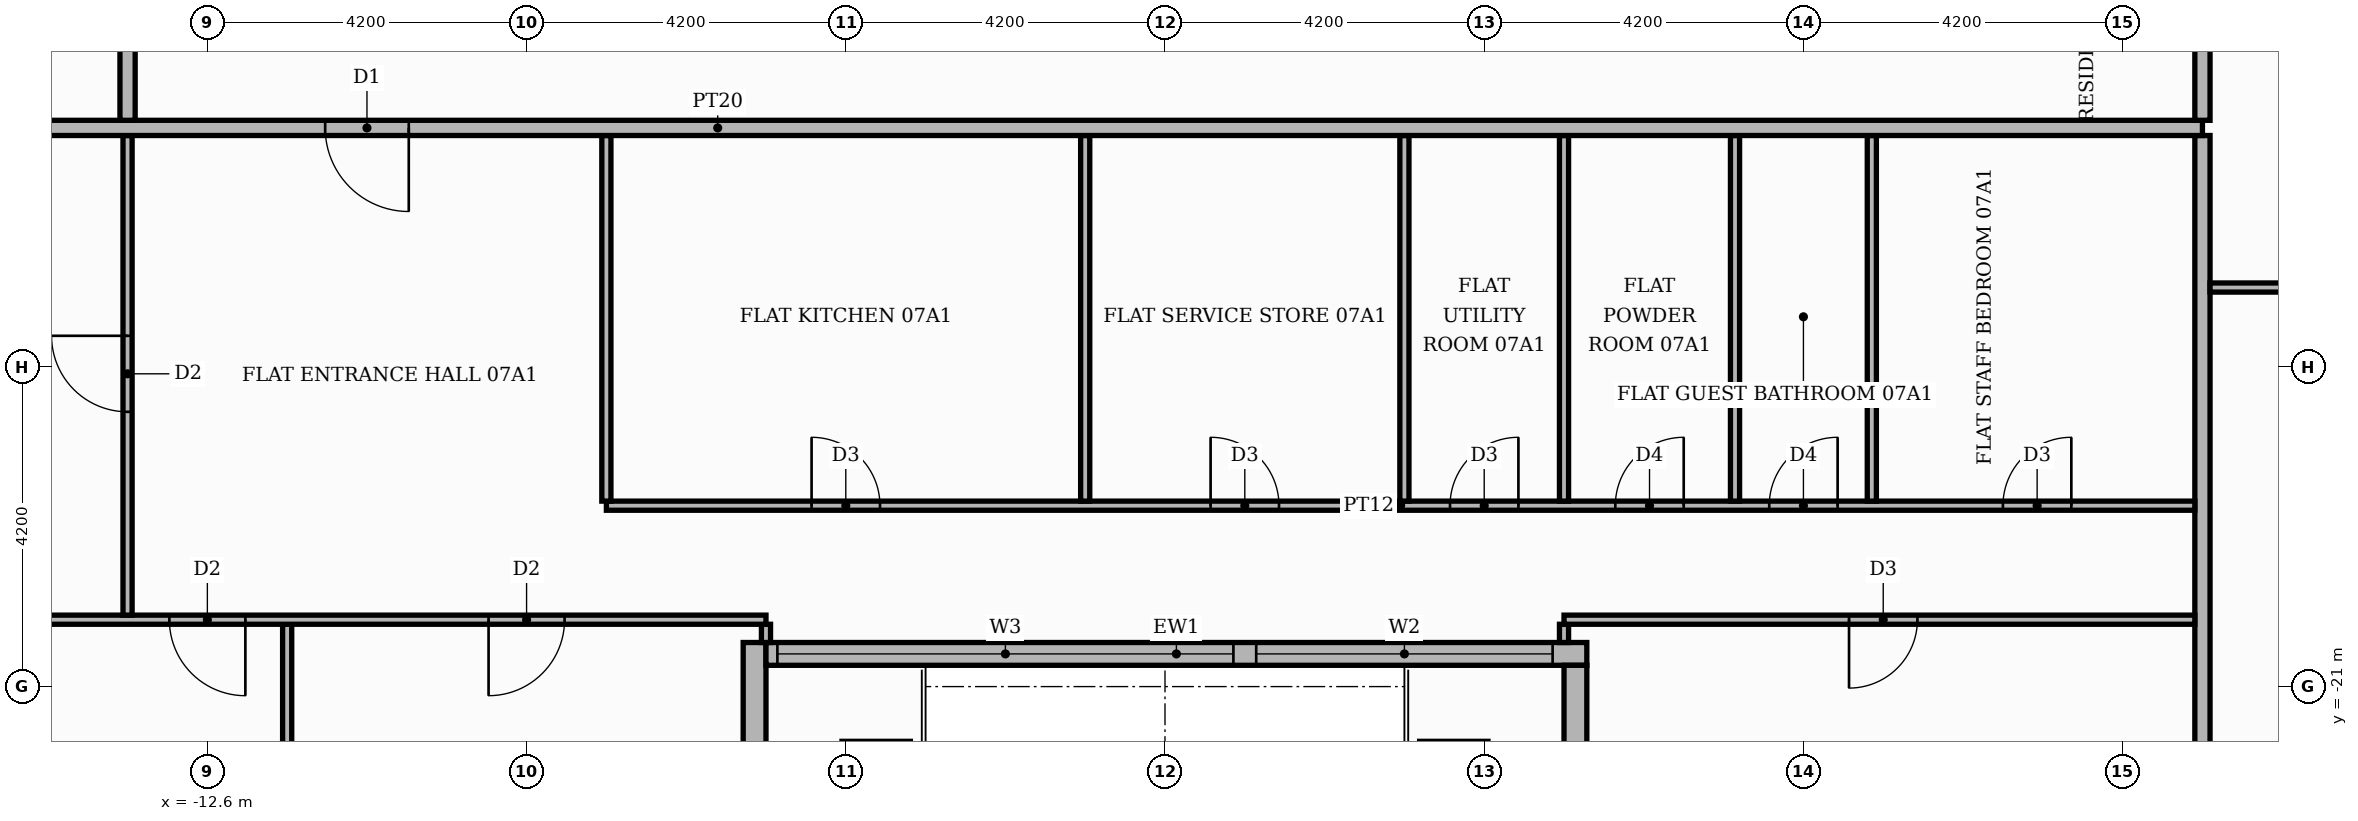
"""IFC4 building model, lengths in metres.
Left out: names, types, materials, properties, quantities, classifications, styles, units other than length and angle.
Written with IfcOpenShell. Run it as: python <this file> out.ifc"""

import sys

from ifc_helpers import new_model, si_unit, direction, frame, frame_2d, origin, place, context, subcontext, project, spatial, rectangle, extrude, element, fill, save


model = new_model("IFC4")
c1 = context("Model", 3, precision=1e-05, world=origin(), true_north=direction((0.0, 1.0)))
c2 = subcontext(c1, "Body", "Model", "MODEL_VIEW")
j1 = project(units=[si_unit("LENGTHUNIT", "METRE"), si_unit("PLANEANGLEUNIT", "RADIAN")], contexts=[c1])
p1 = place(None, origin())
s1 = spatial("IfcSite", under=j1, at=p1, CompositionType="ELEMENT")
p2 = place(p1, origin())
s2 = spatial("IfcBuilding", under=s1, at=p2, CompositionType="ELEMENT")
p3 = place(p2, frame((0.0, 0.0, 34.8)))
s3 = spatial("IfcBuildingStorey", under=s2, at=p3, CompositionType="ELEMENT", Elevation=34.8)
p4 = place(p3, frame((-5.4, -25.42, 0.0), z_axis=(0.0, 0.0, 1.0), x_axis=(0.0, 1.0, 0.0)))
e1 = element("IfcWall", 1, at=p4, inside=s3, PredefinedType="STANDARD", context=c2, shape_type="SweptSolid", body=[
    extrude(rectangle(XDim=5.0, YDim=0.3, at=frame_2d((2.5, 0.0))), origin(), (0.0, 0.0, 1.0), 3.48),
])
p5 = place(p4, frame((1.42, 0.0, 0.0)))
e2 = element("IfcOpeningElement", 2, at=p5, cuts=e1, PredefinedType="OPENING", context=c2, shape_type="SweptSolid", body=[
    extrude(rectangle(XDim=1.8, YDim=2.4, at=frame_2d((0.9, 1.2))), frame((0.0, 0.16, 0.0), z_axis=(0.0, -1.0, 0.0), x_axis=(1.0, 0.0, 0.0)), (0.0, 0.0, 1.0), 0.32),
])
p6 = place(p3, frame((-5.25, -20.57, 0.0), z_axis=(0.0, 0.0, 1.0), x_axis=(1.0, 0.0, 0.0)))
e3 = element("IfcWall", 3, at=p6, inside=s3, PredefinedType="STANDARD", context=c2, shape_type="SweptSolid", body=[
    extrude(rectangle(XDim=10.8, YDim=0.3, at=frame_2d((5.4, 0.0))), origin(), (0.0, 0.0, 1.0), 3.48),
])
p7 = place(p6, frame((0.15, 0.0, 0.9)))
e4 = element("IfcOpeningElement", 4, at=p7, cuts=e3, PredefinedType="OPENING", context=c2, shape_type="SweptSolid", body=[
    extrude(rectangle(XDim=6.0, YDim=2.1, at=frame_2d((3.0, 1.05))), frame((0.0, 0.16, 0.0), z_axis=(0.0, -1.0, 0.0), x_axis=(1.0, 0.0, 0.0)), (0.0, 0.0, 1.0), 0.32),
])
p8 = place(p6, frame((6.45, 0.0, 0.9)))
e5 = element("IfcOpeningElement", 5, at=p8, cuts=e3, PredefinedType="OPENING", context=c2, shape_type="SweptSolid", body=[
    extrude(rectangle(XDim=3.9, YDim=2.1, at=frame_2d((1.95, 1.05))), frame((0.0, 0.16, 0.0), z_axis=(0.0, -1.0, 0.0), x_axis=(1.0, 0.0, 0.0)), (0.0, 0.0, 1.0), 0.32),
])
p9 = place(p3, frame((5.4, -20.72, 0.0), z_axis=(0.0, 0.0, 1.0), x_axis=(0.0, -1.0, 0.0)))
e6 = element("IfcWall", 6, at=p9, inside=s3, PredefinedType="STANDARD", context=c2, shape_type="SweptSolid", body=[
    extrude(rectangle(XDim=5.0, YDim=0.3, at=frame_2d((2.5, 0.0))), origin(), (0.0, 0.0, 1.0), 3.48),
])
p10 = place(p9, frame((1.48, 0.0, 0.0)))
e7 = element("IfcOpeningElement", 7, at=p10, cuts=e6, PredefinedType="OPENING", context=c2, shape_type="SweptSolid", body=[
    extrude(rectangle(XDim=1.8, YDim=2.4, at=frame_2d((0.9, 1.2))), frame((0.0, 0.16, 0.0), z_axis=(0.0, -1.0, 0.0), x_axis=(1.0, 0.0, 0.0)), (0.0, 0.0, 1.0), 0.32),
])
p11 = place(p3, frame((-11.55, -25.42, 0.0), z_axis=(0.0, 0.0, 1.0), x_axis=(0.0, 1.0, 0.0)))
e8 = element("IfcWall", 8, at=p11, inside=s3, PredefinedType="PARTITIONING", context=c2, shape_type="SweptSolid", body=[
    extrude(rectangle(XDim=5.24, YDim=0.12, at=frame_2d((2.62, 0.0))), origin(), (0.0, 0.0, 1.0), 3.48),
])
p12 = place(p3, frame((13.65, -25.42, 0.0), z_axis=(0.0, 0.0, 1.0), x_axis=(0.0, 1.0, 0.0)))
e9 = element("IfcWall", 9, at=p12, inside=s3, PredefinedType="PARTITIONING", context=c2, shape_type="SweptSolid", body=[
    extrude(rectangle(XDim=11.67, YDim=0.2, at=frame_2d((5.835, 0.0))), origin(), (0.0, 0.0, 1.0), 3.48),
])
for number, where, z_axis, x_axis in (
    (10, (-5.25, -20.42, 0.0), (0.0, 0.0, 1.0), (0.0, 1.0, 0.0)),
    (11, (5.25, -20.42, 0.0), (0.0, 0.0, 1.0), (0.0, 1.0, 0.0)),
):
    element("IfcWall", number, at=place(p3, frame(where, z_axis=z_axis, x_axis=x_axis)), inside=s3, PredefinedType="PARTITIONING", context=c2, shape_type="SweptSolid", body=[
        extrude(rectangle(XDim=0.24, YDim=0.12, at=frame_2d((0.12, 0.0))), origin(), (0.0, 0.0, 1.0), 3.48),
    ])
p13 = place(p3, frame((-17.3, -20.12, 0.0), z_axis=(0.0, 0.0, 1.0), x_axis=(1.0, 0.0, 0.0)))
e12 = element("IfcWall", 12, at=p13, inside=s3, PredefinedType="PARTITIONING", context=c2, shape_type="SweptSolid", body=[
    extrude(rectangle(XDim=12.05, YDim=0.12, at=frame_2d((6.025, 0.0))), origin(), (0.0, 0.0, 1.0), 3.48),
])
p14 = place(p13, frame((4.2, 0.0, 0.0)))
e13 = element("IfcOpeningElement", 13, at=p14, cuts=e12, PredefinedType="OPENING", context=c2, shape_type="SweptSolid", body=[
    extrude(rectangle(XDim=1.0, YDim=2.1, at=frame_2d((0.5, 1.05))), frame((0.0, 0.07, 0.0), z_axis=(0.0, -1.0, 0.0), x_axis=(1.0, 0.0, 0.0)), (0.0, 0.0, 1.0), 0.14),
])
p15 = place(p13, frame((8.4, 0.0, 0.0)))
e14 = element("IfcOpeningElement", 14, at=p15, cuts=e12, PredefinedType="OPENING", context=c2, shape_type="SweptSolid", body=[
    extrude(rectangle(XDim=1.0, YDim=2.1, at=frame_2d((0.5, 1.05))), frame((0.0, 0.07, 0.0), z_axis=(0.0, -1.0, 0.0), x_axis=(1.0, 0.0, 0.0)), (0.0, 0.0, 1.0), 0.14),
])
p16 = place(p3, frame((5.25, -20.12, 0.0), z_axis=(0.0, 0.0, 1.0), x_axis=(1.0, 0.0, 0.0)))
e15 = element("IfcWall", 15, at=p16, inside=s3, PredefinedType="PARTITIONING", context=c2, shape_type="SweptSolid", body=[
    extrude(rectangle(XDim=8.3, YDim=0.12, at=frame_2d((4.15, 0.0))), origin(), (0.0, 0.0, 1.0), 3.48),
])
p17 = place(p16, frame((3.75, 0.0, 0.0)))
e16 = element("IfcOpeningElement", 16, at=p17, cuts=e15, PredefinedType="OPENING", context=c2, shape_type="SweptSolid", body=[
    extrude(rectangle(XDim=0.9, YDim=2.1, at=frame_2d((0.45, 1.05))), frame((0.0, 0.07, 0.0), z_axis=(0.0, -1.0, 0.0), x_axis=(1.0, 0.0, 0.0)), (0.0, 0.0, 1.0), 0.14),
])
p18 = place(p3, frame((-13.65, -20.06, 0.0), z_axis=(0.0, 0.0, 1.0), x_axis=(0.0, 1.0, 0.0)))
e17 = element("IfcWall", 17, at=p18, inside=s3, PredefinedType="PARTITIONING", context=c2, shape_type="SweptSolid", body=[
    extrude(rectangle(XDim=6.31, YDim=0.12, at=frame_2d((3.155, 0.0))), origin(), (0.0, 0.0, 1.0), 3.48),
])
p19 = place(p18, frame((2.675, 0.0, 0.0)))
e18 = element("IfcOpeningElement", 18, at=p19, cuts=e17, PredefinedType="OPENING", context=c2, shape_type="SweptSolid", body=[
    extrude(rectangle(XDim=1.0, YDim=2.1, at=frame_2d((0.5, 1.05))), frame((0.0, 0.07, 0.0), z_axis=(0.0, -1.0, 0.0), x_axis=(1.0, 0.0, 0.0)), (0.0, 0.0, 1.0), 0.14),
])
p20 = place(p3, frame((-7.35, -18.62, 0.0), z_axis=(0.0, 0.0, 1.0), x_axis=(1.0, 0.0, 0.0)))
e19 = element("IfcWall", 19, at=p20, inside=s3, PredefinedType="PARTITIONING", context=c2, shape_type="SweptSolid", body=[
    extrude(rectangle(XDim=20.9, YDim=0.12, at=frame_2d((10.45, 0.0))), origin(), (0.0, 0.0, 1.0), 3.48),
])
p21 = place(p20, frame((2.7, 0.0, 0.0)))
e20 = element("IfcOpeningElement", 20, at=p21, cuts=e19, PredefinedType="OPENING", context=c2, shape_type="SweptSolid", body=[
    extrude(rectangle(XDim=0.9, YDim=2.1, at=frame_2d((0.45, 1.05))), frame((0.0, 0.07, 0.0), z_axis=(0.0, -1.0, 0.0), x_axis=(1.0, 0.0, 0.0)), (0.0, 0.0, 1.0), 0.14),
])
p22 = place(p20, frame((7.95, 0.0, 0.0)))
e21 = element("IfcOpeningElement", 21, at=p22, cuts=e19, PredefinedType="OPENING", context=c2, shape_type="SweptSolid", body=[
    extrude(rectangle(XDim=0.9, YDim=2.1, at=frame_2d((0.45, 1.05))), frame((0.0, 0.07, 0.0), z_axis=(0.0, -1.0, 0.0), x_axis=(1.0, 0.0, 0.0)), (0.0, 0.0, 1.0), 0.14),
])
p23 = place(p20, frame((11.1, 0.0, 0.0)))
e22 = element("IfcOpeningElement", 22, at=p23, cuts=e19, PredefinedType="OPENING", context=c2, shape_type="SweptSolid", body=[
    extrude(rectangle(XDim=0.9, YDim=2.1, at=frame_2d((0.45, 1.05))), frame((0.0, 0.07, 0.0), z_axis=(0.0, -1.0, 0.0), x_axis=(1.0, 0.0, 0.0)), (0.0, 0.0, 1.0), 0.14),
])
p24 = place(p20, frame((13.275, 0.0, 0.0)))
e23 = element("IfcOpeningElement", 23, at=p24, cuts=e19, PredefinedType="OPENING", context=c2, shape_type="SweptSolid", body=[
    extrude(rectangle(XDim=0.9, YDim=2.1, at=frame_2d((0.45, 1.05))), frame((0.0, 0.07, 0.0), z_axis=(0.0, -1.0, 0.0), x_axis=(1.0, 0.0, 0.0)), (0.0, 0.0, 1.0), 0.14),
])
p25 = place(p20, frame((15.3, 0.0, 0.0)))
e24 = element("IfcOpeningElement", 24, at=p25, cuts=e19, PredefinedType="OPENING", context=c2, shape_type="SweptSolid", body=[
    extrude(rectangle(XDim=0.9, YDim=2.1, at=frame_2d((0.45, 1.05))), frame((0.0, 0.07, 0.0), z_axis=(0.0, -1.0, 0.0), x_axis=(1.0, 0.0, 0.0)), (0.0, 0.0, 1.0), 0.14),
])
p26 = place(p20, frame((18.375, 0.0, 0.0)))
e25 = element("IfcOpeningElement", 25, at=p26, cuts=e19, PredefinedType="OPENING", context=c2, shape_type="SweptSolid", body=[
    extrude(rectangle(XDim=0.9, YDim=2.1, at=frame_2d((0.45, 1.05))), frame((0.0, 0.07, 0.0), z_axis=(0.0, -1.0, 0.0), x_axis=(1.0, 0.0, 0.0)), (0.0, 0.0, 1.0), 0.14),
])
for number, where, z_axis, x_axis in (
    (26, (-7.35, -18.56, 0.0), (0.0, 0.0, 1.0), (0.0, 1.0, 0.0)),
    (27, (-1.05, -18.56, 0.0), (0.0, 0.0, 1.0), (0.0, 1.0, 0.0)),
    (28, (3.15, -18.56, 0.0), (0.0, 0.0, 1.0), (0.0, 1.0, 0.0)),
    (29, (5.25, -18.56, 0.0), (0.0, 0.0, 1.0), (0.0, 1.0, 0.0)),
    (30, (7.5, -18.56, 0.0), (0.0, 0.0, 1.0), (0.0, 1.0, 0.0)),
    (31, (9.3, -18.56, 0.0), (0.0, 0.0, 1.0), (0.0, 1.0, 0.0)),
):
    element("IfcWall", number, at=place(p3, frame(where, z_axis=z_axis, x_axis=x_axis)), inside=s3, PredefinedType="PARTITIONING", context=c2, shape_type="SweptSolid", body=[
        extrude(rectangle(XDim=4.81, YDim=0.12, at=frame_2d((2.405, 0.0))), origin(), (0.0, 0.0, 1.0), 3.48),
    ])
p27 = place(p3, frame((13.75, -15.75, 0.0), z_axis=(0.0, 0.0, 1.0), x_axis=(1.0, 0.0, 0.0)))
e32 = element("IfcWall", 32, at=p27, inside=s3, PredefinedType="PARTITIONING", context=c2, shape_type="SweptSolid", body=[
    extrude(rectangle(XDim=6.67, YDim=0.12, at=frame_2d((3.335, 0.0))), origin(), (0.0, 0.0, 1.0), 3.48),
])
p28 = place(p27, frame((2.785, 0.0, 0.0)))
e33 = element("IfcOpeningElement", 33, at=p28, cuts=e32, PredefinedType="OPENING", context=c2, shape_type="SweptSolid", body=[
    extrude(rectangle(XDim=1.0, YDim=2.1, at=frame_2d((0.5, 1.05))), frame((0.0, 0.07, 0.0), z_axis=(0.0, -1.0, 0.0), x_axis=(1.0, 0.0, 0.0)), (0.0, 0.0, 1.0), 0.14),
])
p29 = place(p3, frame((-25.42, -13.65, 0.0), z_axis=(0.0, 0.0, 1.0), x_axis=(1.0, 0.0, 0.0)))
e34 = element("IfcWall", 34, at=p29, inside=s3, PredefinedType="PARTITIONING", context=c2, shape_type="SweptSolid", body=[
    extrude(rectangle(XDim=39.07, YDim=0.2, at=frame_2d((19.535, 0.0))), origin(), (0.0, 0.0, 1.0), 3.48),
])
p30 = place(p29, frame((14.37, 0.0, 0.0)))
e35 = element("IfcOpeningElement", 35, at=p30, cuts=e34, PredefinedType="OPENING", context=c2, shape_type="SweptSolid", body=[
    extrude(rectangle(XDim=1.1, YDim=2.4, at=frame_2d((0.55, 1.2))), frame((0.0, 0.11, 0.0), z_axis=(0.0, -1.0, 0.0), x_axis=(1.0, 0.0, 0.0)), (0.0, 0.0, 1.0), 0.22),
])
p31 = place(p3, frame((-13.65, -13.55, 0.0), z_axis=(0.0, 0.0, 1.0), x_axis=(0.0, 1.0, 0.0)))
e36 = element("IfcWall", 36, at=p31, inside=s3, PredefinedType="PARTITIONING", context=c2, shape_type="SweptSolid", body=[
    extrude(rectangle(XDim=27.1, YDim=0.2, at=frame_2d((13.55, 0.0))), origin(), (0.0, 0.0, 1.0), 3.48),
])
p32 = place(p31, frame((24.55, 0.0, 0.0)))
e37 = element("IfcOpeningElement", 37, at=p32, cuts=e36, PredefinedType="OPENING", context=c2, shape_type="SweptSolid", body=[
    extrude(rectangle(XDim=1.1, YDim=2.4, at=frame_2d((0.55, 1.2))), frame((0.0, 0.11, 0.0), z_axis=(0.0, -1.0, 0.0), x_axis=(1.0, 0.0, 0.0)), (0.0, 0.0, 1.0), 0.22),
])
p33 = place(p3, frame((13.65, -13.55, 0.0), z_axis=(0.0, 0.0, 1.0), x_axis=(0.0, 1.0, 0.0)))
e38 = element("IfcWall", 38, at=p33, inside=s3, PredefinedType="PARTITIONING", context=c2, shape_type="SweptSolid", body=[
    extrude(rectangle(XDim=8.2, YDim=0.2, at=frame_2d((4.1, 0.0))), origin(), (0.0, 0.0, 1.0), 3.48),
])
p34 = place(p33, frame((1.45, 0.0, 0.0)))
e39 = element("IfcOpeningElement", 39, at=p34, cuts=e38, PredefinedType="OPENING", context=c2, shape_type="SweptSolid", body=[
    extrude(rectangle(XDim=1.1, YDim=2.4, at=frame_2d((0.55, 1.2))), frame((0.0, 0.11, 0.0), z_axis=(0.0, -1.0, 0.0), x_axis=(1.0, 0.0, 0.0)), (0.0, 0.0, 1.0), 0.22),
])
p35 = place(p7, origin())
e40 = element("IfcWindow", 40, at=p35, inside=s3, PartitioningType="SINGLE_PANEL", PredefinedType="WINDOW", context=c2, shape_type="SweptSolid", body=[
    extrude(rectangle(XDim=6.0, YDim=2.1, at=frame_2d((3.0, 1.05))), frame((0.0, 0.03, 0.0), z_axis=(0.0, -1.0, 0.0), x_axis=(1.0, 0.0, 0.0)), (0.0, 0.0, 1.0), 0.06),
])
fill(e4, e40)
p36 = place(p8, origin())
e41 = element("IfcWindow", 41, at=p36, inside=s3, PartitioningType="SINGLE_PANEL", PredefinedType="WINDOW", context=c2, shape_type="SweptSolid", body=[
    extrude(rectangle(XDim=3.9, YDim=2.1, at=frame_2d((1.95, 1.05))), frame((0.0, 0.03, 0.0), z_axis=(0.0, -1.0, 0.0), x_axis=(1.0, 0.0, 0.0)), (0.0, 0.0, 1.0), 0.06),
])
fill(e5, e41)
p37 = place(p30, frame((1.1, 0.0, 0.0), z_axis=(0.0, 0.0, 1.0), x_axis=(-1.0, 0.0, 0.0)))
e42 = element("IfcDoor", 42, at=p37, inside=s3, OperationType="SINGLE_SWING_RIGHT", PredefinedType="DOOR", context=c2, shape_type="SweptSolid", body=[
    extrude(rectangle(XDim=1.1, YDim=2.4, at=frame_2d((0.55, 1.2))), frame((0.0, 0.025, 0.0), z_axis=(0.0, -1.0, 0.0), x_axis=(1.0, 0.0, 0.0)), (0.0, 0.0, 1.0), 0.05),
])
fill(e35, e42)
p38 = place(p19, origin())
e43 = element("IfcDoor", 43, at=p38, inside=s3, OperationType="SINGLE_SWING_RIGHT", PredefinedType="DOOR", context=c2, shape_type="SweptSolid", body=[
    extrude(rectangle(XDim=1.0, YDim=2.1, at=frame_2d((0.5, 1.05))), frame((0.0, 0.025, 0.0), z_axis=(0.0, -1.0, 0.0), x_axis=(1.0, 0.0, 0.0)), (0.0, 0.0, 1.0), 0.05),
])
fill(e18, e43)
p39 = place(p21, origin())
e44 = element("IfcDoor", 44, at=p39, inside=s3, OperationType="SINGLE_SWING_LEFT", PredefinedType="DOOR", context=c2, shape_type="SweptSolid", body=[
    extrude(rectangle(XDim=0.9, YDim=2.1, at=frame_2d((0.45, 1.05))), frame((0.0, 0.025, 0.0), z_axis=(0.0, -1.0, 0.0), x_axis=(1.0, 0.0, 0.0)), (0.0, 0.0, 1.0), 0.05),
])
fill(e20, e44)
p40 = place(p22, origin())
e45 = element("IfcDoor", 45, at=p40, inside=s3, OperationType="SINGLE_SWING_LEFT", PredefinedType="DOOR", context=c2, shape_type="SweptSolid", body=[
    extrude(rectangle(XDim=0.9, YDim=2.1, at=frame_2d((0.45, 1.05))), frame((0.0, 0.025, 0.0), z_axis=(0.0, -1.0, 0.0), x_axis=(1.0, 0.0, 0.0)), (0.0, 0.0, 1.0), 0.05),
])
fill(e21, e45)
p41 = place(p23, origin())
e46 = element("IfcDoor", 46, at=p41, inside=s3, OperationType="SINGLE_SWING_RIGHT", PredefinedType="DOOR", context=c2, shape_type="SweptSolid", body=[
    extrude(rectangle(XDim=0.9, YDim=2.1, at=frame_2d((0.45, 1.05))), frame((0.0, 0.025, 0.0), z_axis=(0.0, -1.0, 0.0), x_axis=(1.0, 0.0, 0.0)), (0.0, 0.0, 1.0), 0.05),
])
fill(e22, e46)
p42 = place(p24, origin())
e47 = element("IfcDoor", 47, at=p42, inside=s3, OperationType="SINGLE_SWING_RIGHT", PredefinedType="DOOR", context=c2, shape_type="SweptSolid", body=[
    extrude(rectangle(XDim=0.9, YDim=2.1, at=frame_2d((0.45, 1.05))), frame((0.0, 0.025, 0.0), z_axis=(0.0, -1.0, 0.0), x_axis=(1.0, 0.0, 0.0)), (0.0, 0.0, 1.0), 0.05),
])
fill(e23, e47)
p43 = place(p25, origin())
e48 = element("IfcDoor", 48, at=p43, inside=s3, OperationType="SINGLE_SWING_RIGHT", PredefinedType="DOOR", context=c2, shape_type="SweptSolid", body=[
    extrude(rectangle(XDim=0.9, YDim=2.1, at=frame_2d((0.45, 1.05))), frame((0.0, 0.025, 0.0), z_axis=(0.0, -1.0, 0.0), x_axis=(1.0, 0.0, 0.0)), (0.0, 0.0, 1.0), 0.05),
])
fill(e24, e48)
p44 = place(p26, origin())
e49 = element("IfcDoor", 49, at=p44, inside=s3, OperationType="SINGLE_SWING_RIGHT", PredefinedType="DOOR", context=c2, shape_type="SweptSolid", body=[
    extrude(rectangle(XDim=0.9, YDim=2.1, at=frame_2d((0.45, 1.05))), frame((0.0, 0.025, 0.0), z_axis=(0.0, -1.0, 0.0), x_axis=(1.0, 0.0, 0.0)), (0.0, 0.0, 1.0), 0.05),
])
fill(e25, e49)
p45 = place(p14, frame((1.0, 0.0, 0.0), z_axis=(0.0, 0.0, 1.0), x_axis=(-1.0, 0.0, 0.0)))
e50 = element("IfcDoor", 50, at=p45, inside=s3, OperationType="SINGLE_SWING_RIGHT", PredefinedType="DOOR", context=c2, shape_type="SweptSolid", body=[
    extrude(rectangle(XDim=1.0, YDim=2.1, at=frame_2d((0.5, 1.05))), frame((0.0, 0.025, 0.0), z_axis=(0.0, -1.0, 0.0), x_axis=(1.0, 0.0, 0.0)), (0.0, 0.0, 1.0), 0.05),
])
fill(e13, e50)
p46 = place(p15, frame((1.0, 0.0, 0.0), z_axis=(0.0, 0.0, 1.0), x_axis=(-1.0, 0.0, 0.0)))
e51 = element("IfcDoor", 51, at=p46, inside=s3, OperationType="SINGLE_SWING_LEFT", PredefinedType="DOOR", context=c2, shape_type="SweptSolid", body=[
    extrude(rectangle(XDim=1.0, YDim=2.1, at=frame_2d((0.5, 1.05))), frame((0.0, 0.025, 0.0), z_axis=(0.0, -1.0, 0.0), x_axis=(1.0, 0.0, 0.0)), (0.0, 0.0, 1.0), 0.05),
])
fill(e14, e51)
p47 = place(p17, frame((0.9, 0.0, 0.0), z_axis=(0.0, 0.0, 1.0), x_axis=(-1.0, 0.0, 0.0)))
e52 = element("IfcDoor", 52, at=p47, inside=s3, OperationType="SINGLE_SWING_LEFT", PredefinedType="DOOR", context=c2, shape_type="SweptSolid", body=[
    extrude(rectangle(XDim=0.9, YDim=2.1, at=frame_2d((0.45, 1.05))), frame((0.0, 0.025, 0.0), z_axis=(0.0, -1.0, 0.0), x_axis=(1.0, 0.0, 0.0)), (0.0, 0.0, 1.0), 0.05),
])
fill(e16, e52)
save(model, sys.argv[1])
